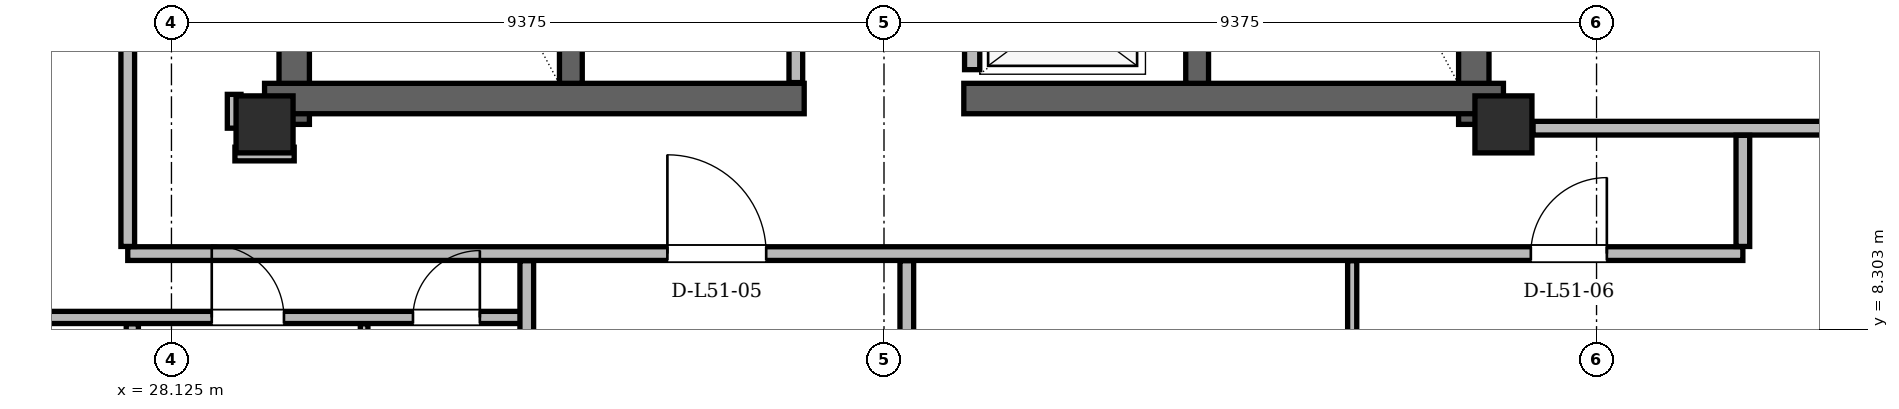
"""IFC4 building model, lengths in metres.
Left out: names, types, materials, properties, quantities, classifications, styles, units other than length and angle.
Written with IfcOpenShell. Run it as: python <this file> out.ifc"""

import sys

from ifc_helpers import new_model, si_unit, direction, frame, frame_2d, origin, origin_2d, place, context, subcontext, project, spatial, rectangle, hollow_rectangle, extrude, element, fill, save


model = new_model("IFC4")
c1 = context("Model", 3, precision=1e-05, world=origin(), true_north=direction((0.0, 1.0)))
c2 = subcontext(c1, "Body", "Model", "MODEL_VIEW")
j1 = project(units=[si_unit("LENGTHUNIT", "METRE"), si_unit("PLANEANGLEUNIT", "RADIAN")], contexts=[c1])
p1 = place(None, origin())
s1 = spatial("IfcSite", under=j1, at=p1, CompositionType="ELEMENT")
p2 = place(p1, origin())
s2 = spatial("IfcBuilding", under=s1, at=p2, CompositionType="ELEMENT")
p3 = place(p2, frame((0.0, 0.0, 193.8)))
s3 = spatial("IfcBuildingStorey", under=s2, at=p3, CompositionType="ELEMENT", Elevation=193.8)
for number, where, z_axis, x_axis in (
    (1, (29.35, 11.0, 0.0), (0.0, 0.0, 1.0), (1.0, 0.0, 0.0)),
    (2, (45.65, 11.0, 0.0), (0.0, 0.0, 1.0), (1.0, 0.0, 0.0)),
):
    element("IfcColumn", number, at=place(p3, frame(where, z_axis=z_axis, x_axis=x_axis)), inside=s3, PredefinedType="COLUMN", context=c2, shape_type="SweptSolid", body=[
        extrude(hollow_rectangle(XDim=0.75, YDim=0.75, WallThickness=0.06, at=origin_2d()), origin(), (0.0, 0.0, 1.0), 3.6),
    ])
for number, where, z_axis, x_axis in (
    (3, (29.74, 11.0, 0.0), (0.0, 0.0, 1.0), (0.0, 1.0, 0.0)),
    (4, (45.26, 11.0, 0.0), (0.0, 0.0, 1.0), (0.0, 1.0, 0.0)),
):
    element("IfcWall", number, at=place(p3, frame(where, z_axis=z_axis, x_axis=x_axis)), inside=s3, PredefinedType="SHEAR", context=c2, shape_type="SweptSolid", body=[
        extrude(rectangle(XDim=13.3, YDim=0.4, at=frame_2d((6.65, 0.0))), origin(), (0.0, 0.0, 1.0), 3.38),
    ])
for number, where, z_axis, x_axis in (
    (5, (29.35, 11.34, 0.0), (0.0, 0.0, 1.0), (1.0, 0.0, 0.0)),
    (6, (38.55, 11.34, 0.0), (0.0, 0.0, 1.0), (1.0, 0.0, 0.0)),
):
    element("IfcWall", number, at=place(p3, frame(where, z_axis=z_axis, x_axis=x_axis)), inside=s3, PredefinedType="SHEAR", context=c2, shape_type="SweptSolid", body=[
        extrude(rectangle(XDim=7.1, YDim=0.4, at=frame_2d((3.55, 0.0))), origin(), (0.0, 0.0, 1.0), 3.38),
    ])
for number, where, z_axis, x_axis in (
    (7, (33.38, 11.54, 0.0), (0.0, 0.0, 1.0), (0.0, 1.0, 0.0)),
    (8, (41.62, 11.54, 0.0), (0.0, 0.0, 1.0), (0.0, 1.0, 0.0)),
):
    element("IfcWall", number, at=place(p3, frame(where, z_axis=z_axis, x_axis=x_axis)), inside=s3, PredefinedType="SHEAR", context=c2, shape_type="SweptSolid", body=[
        extrude(rectangle(XDim=7.62, YDim=0.3, at=frame_2d((3.81, 0.0))), origin(), (0.0, 0.0, 1.0), 3.38),
    ])
p4 = place(p3, frame((59.426, 11.839, 0.0), z_axis=(0.0, 0.0, 1.0), x_axis=(-0.499997159266, 0.866027043877, 0.0)))
e9 = element("IfcWall", 9, at=p4, inside=s3, PredefinedType="SOLIDWALL", context=c2, shape_type="SweptSolid", body=[
    extrude(rectangle(XDim=36.235, YDim=0.29, at=frame_2d((18.117, 0.0))), origin(), (0.0, 0.0, 1.0), 2.677),
])
p5 = place(p4, frame((6.579, 0.0, 0.0)))
e10 = element("IfcOpeningElement", 10, at=p5, cuts=e9, PredefinedType="OPENING", context=c2, shape_type="SweptSolid", body=[
    extrude(rectangle(XDim=1.5, YDim=2.2, at=frame_2d((0.75, 1.1))), frame((0.0, 0.145, 0.0), z_axis=(0.0, -1.0, 0.0), x_axis=(1.0, 0.0, 0.0)), (0.0, 0.0, 1.0), 0.29),
])
p6 = place(p4, frame((26.7, 0.0, 0.0)))
e11 = element("IfcOpeningElement", 11, at=p6, cuts=e9, PredefinedType="OPENING", context=c2, shape_type="SweptSolid", body=[
    extrude(rectangle(XDim=1.5, YDim=2.2, at=frame_2d((0.75, 1.1))), frame((0.0, 0.145, 0.0), z_axis=(0.0, -1.0, 0.0), x_axis=(1.0, 0.0, 0.0)), (0.0, 0.0, 1.0), 0.29),
])
p7 = place(p4, frame((34.18, 0.0, 0.85)))
e12 = element("IfcOpeningElement", 12, at=p7, cuts=e9, PredefinedType="OPENING", context=c2, shape_type="SweptSolid", body=[
    extrude(rectangle(XDim=1.2, YDim=1.48, at=frame_2d((0.6, 0.74))), frame((0.0, 0.145, 0.0), z_axis=(0.0, -1.0, 0.0), x_axis=(1.0, 0.0, 0.0)), (0.0, 0.0, 1.0), 0.29),
])
p8 = place(p4, frame((16.442, 0.0, 0.85)))
e13 = element("IfcOpeningElement", 13, at=p8, cuts=e9, PredefinedType="OPENING", context=c2, shape_type="SweptSolid", body=[
    extrude(rectangle(XDim=2.5, YDim=1.717, at=frame_2d((1.25, 0.858))), frame((0.0, 0.145, 0.0), z_axis=(0.0, -1.0, 0.0), x_axis=(1.0, 0.0, 0.0)), (0.0, 0.0, 1.0), 0.29),
])
p9 = place(p3, frame((33.691, 43.219, 0.0), z_axis=(0.0, 0.0, 1.0), x_axis=(-0.499997159266, -0.866027043877, 0.0)))
e14 = element("IfcWall", 14, at=p9, inside=s3, PredefinedType="SOLIDWALL", context=c2, shape_type="SweptSolid", body=[
    extrude(rectangle(XDim=36.235, YDim=0.29, at=frame_2d((18.117, 0.0))), origin(), (0.0, 0.0, 1.0), 2.677),
])
p10 = place(p9, frame((6.579, 0.0, 0.0)))
e15 = element("IfcOpeningElement", 15, at=p10, cuts=e14, PredefinedType="OPENING", context=c2, shape_type="SweptSolid", body=[
    extrude(rectangle(XDim=1.5, YDim=2.2, at=frame_2d((0.75, 1.1))), frame((0.0, 0.145, 0.0), z_axis=(0.0, -1.0, 0.0), x_axis=(1.0, 0.0, 0.0)), (0.0, 0.0, 1.0), 0.29),
])
p11 = place(p9, frame((26.7, 0.0, 0.0)))
e16 = element("IfcOpeningElement", 16, at=p11, cuts=e14, PredefinedType="OPENING", context=c2, shape_type="SweptSolid", body=[
    extrude(rectangle(XDim=1.5, YDim=2.2, at=frame_2d((0.75, 1.1))), frame((0.0, 0.145, 0.0), z_axis=(0.0, -1.0, 0.0), x_axis=(1.0, 0.0, 0.0)), (0.0, 0.0, 1.0), 0.29),
])
p12 = place(p9, frame((32.74, 0.0, 0.85)))
e17 = element("IfcOpeningElement", 17, at=p12, cuts=e14, PredefinedType="OPENING", context=c2, shape_type="SweptSolid", body=[
    extrude(rectangle(XDim=2.4, YDim=1.717, at=frame_2d((1.2, 0.858))), frame((0.0, 0.145, 0.0), z_axis=(0.0, -1.0, 0.0), x_axis=(1.0, 0.0, 0.0)), (0.0, 0.0, 1.0), 0.29),
])
p13 = place(p9, frame((21.971, 0.0, 0.85)))
e18 = element("IfcOpeningElement", 18, at=p13, cuts=e14, PredefinedType="OPENING", context=c2, shape_type="SweptSolid", body=[
    extrude(rectangle(XDim=2.0, YDim=1.717, at=frame_2d((1.0, 0.858))), frame((0.0, 0.145, 0.0), z_axis=(0.0, -1.0, 0.0), x_axis=(1.0, 0.0, 0.0)), (0.0, 0.0, 1.0), 0.29),
])
p14 = place(p9, frame((2.383, 0.0, 0.85)))
e19 = element("IfcOpeningElement", 19, at=p14, cuts=e14, PredefinedType="OPENING", context=c2, shape_type="SweptSolid", body=[
    extrude(rectangle(XDim=1.6, YDim=1.7, at=frame_2d((0.8, 0.85))), frame((0.0, 0.145, 0.0), z_axis=(0.0, -1.0, 0.0), x_axis=(1.0, 0.0, 0.0)), (0.0, 0.0, 1.0), 0.29),
])
p15 = place(p9, frame((13.348, 0.0, 0.85)))
e20 = element("IfcOpeningElement", 20, at=p15, cuts=e14, PredefinedType="OPENING", context=c2, shape_type="SweptSolid", body=[
    extrude(rectangle(XDim=3.0, YDim=1.717, at=frame_2d((1.5, 0.858))), frame((0.0, 0.145, 0.0), z_axis=(0.0, -1.0, 0.0), x_axis=(1.0, 0.0, 0.0)), (0.0, 0.0, 1.0), 0.29),
])
p16 = place(p3, frame((36.34, 11.55, 0.0), z_axis=(0.0, 0.0, 1.0), x_axis=(0.0, 1.0, 0.0)))
e21 = element("IfcWall", 21, at=p16, inside=s3, PredefinedType="PARTITIONING", context=c2, shape_type="SweptSolid", body=[
    extrude(rectangle(XDim=5.55, YDim=0.18, at=frame_2d((2.775, 0.0))), origin(), (0.0, 0.0, 1.0), 3.38),
])
p17 = place(p16, frame((2.85, 0.0, 0.0)))
e22 = element("IfcOpeningElement", 22, at=p17, cuts=e21, PredefinedType="OPENING", context=c2, shape_type="SweptSolid", body=[
    extrude(rectangle(XDim=0.95, YDim=2.1, at=frame_2d((0.475, 1.05))), frame((0.0, 0.09, 0.0), z_axis=(0.0, -1.0, 0.0), x_axis=(1.0, 0.0, 0.0)), (0.0, 0.0, 1.0), 0.18),
])
p18 = place(p3, frame((38.66, 11.72, 0.0), z_axis=(0.0, 0.0, 1.0), x_axis=(0.0, 1.0, 0.0)))
e23 = element("IfcWall", 23, at=p18, inside=s3, PredefinedType="PARTITIONING", context=c2, shape_type="SweptSolid", body=[
    extrude(rectangle(XDim=9.1, YDim=0.2, at=frame_2d((4.55, 0.0))), origin(), (0.0, 0.0, 1.0), 3.38),
])
p19 = place(p18, frame((0.255, 0.0, 0.0)))
e24 = element("IfcOpeningElement", 24, at=p19, cuts=e23, PredefinedType="OPENING", context=c2, shape_type="SweptSolid", body=[
    extrude(rectangle(XDim=1.05, YDim=2.15, at=frame_2d((0.525, 1.075))), frame((0.0, 0.1, 0.0), z_axis=(0.0, -1.0, 0.0), x_axis=(1.0, 0.0, 0.0)), (0.0, 0.0, 1.0), 0.2),
])
p20 = place(p18, frame((2.105, 0.0, 0.0)))
e25 = element("IfcOpeningElement", 25, at=p20, cuts=e23, PredefinedType="OPENING", context=c2, shape_type="SweptSolid", body=[
    extrude(rectangle(XDim=1.05, YDim=2.15, at=frame_2d((0.525, 1.075))), frame((0.0, 0.1, 0.0), z_axis=(0.0, -1.0, 0.0), x_axis=(1.0, 0.0, 0.0)), (0.0, 0.0, 1.0), 0.2),
])
p21 = place(p18, frame((3.955, 0.0, 0.0)))
e26 = element("IfcOpeningElement", 26, at=p21, cuts=e23, PredefinedType="OPENING", context=c2, shape_type="SweptSolid", body=[
    extrude(rectangle(XDim=1.05, YDim=2.15, at=frame_2d((0.525, 1.075))), frame((0.0, 0.1, 0.0), z_axis=(0.0, -1.0, 0.0), x_axis=(1.0, 0.0, 0.0)), (0.0, 0.0, 1.0), 0.2),
])
p22 = place(p3, frame((17.697, 8.46, 0.0), z_axis=(0.0, 0.0, 1.0), x_axis=(1.0, 0.0, 0.0)))
e27 = element("IfcWall", 27, at=p22, inside=s3, PredefinedType="PARTITIONING", context=c2, shape_type="SweptSolid", body=[
    extrude(rectangle(XDim=15.153, YDim=0.16, at=frame_2d((7.577, 0.0))), origin(), (0.0, 0.0, 1.0), 2.913),
])
p23 = place(p22, frame((2.392, 0.0, 0.0)))
e28 = element("IfcOpeningElement", 28, at=p23, cuts=e27, PredefinedType="OPENING", context=c2, shape_type="SweptSolid", body=[
    extrude(rectangle(XDim=0.92, YDim=2.12, at=frame_2d((0.46, 1.06))), frame((0.0, 0.08, 0.0), z_axis=(0.0, -1.0, 0.0), x_axis=(1.0, 0.0, 0.0)), (0.0, 0.0, 1.0), 0.16),
])
p24 = place(p22, frame((7.346, 0.0, 0.0)))
e29 = element("IfcOpeningElement", 29, at=p24, cuts=e27, PredefinedType="OPENING", context=c2, shape_type="SweptSolid", body=[
    extrude(rectangle(XDim=0.95, YDim=2.1, at=frame_2d((0.475, 1.05))), frame((0.0, 0.08, 0.0), z_axis=(0.0, -1.0, 0.0), x_axis=(1.0, 0.0, 0.0)), (0.0, 0.0, 1.0), 0.16),
])
p25 = place(p22, frame((10.958, 0.0, 0.0)))
e30 = element("IfcOpeningElement", 30, at=p25, cuts=e27, PredefinedType="OPENING", context=c2, shape_type="SweptSolid", body=[
    extrude(rectangle(XDim=0.95, YDim=2.1, at=frame_2d((0.475, 1.05))), frame((0.0, 0.08, 0.0), z_axis=(0.0, -1.0, 0.0), x_axis=(1.0, 0.0, 0.0)), (0.0, 0.0, 1.0), 0.16),
])
p26 = place(p22, frame((13.606, 0.0, 0.0)))
e31 = element("IfcOpeningElement", 31, at=p26, cuts=e27, PredefinedType="OPENING", context=c2, shape_type="SweptSolid", body=[
    extrude(rectangle(XDim=0.88, YDim=2.08, at=frame_2d((0.44, 1.04))), frame((0.0, 0.08, 0.0), z_axis=(0.0, -1.0, 0.0), x_axis=(1.0, 0.0, 0.0)), (0.0, 0.0, 1.0), 0.16),
])
p27 = place(p3, frame((27.55, 9.3, 0.0), z_axis=(0.0, 0.0, 1.0), x_axis=(1.0, 0.0, 0.0)))
e32 = element("IfcWall", 32, at=p27, inside=s3, PredefinedType="PARTITIONING", context=c2, shape_type="SweptSolid", body=[
    extrude(rectangle(XDim=21.25, YDim=0.18, at=frame_2d((10.625, 0.0))), origin(), (0.0, 0.0, 1.0), 2.913),
])
p28 = place(p27, frame((7.1, 0.0, 0.0)))
e33 = element("IfcOpeningElement", 33, at=p28, cuts=e32, PredefinedType="OPENING", context=c2, shape_type="SweptSolid", body=[
    extrude(rectangle(XDim=1.3, YDim=2.2, at=frame_2d((0.65, 1.1))), frame((0.0, 0.09, 0.0), z_axis=(0.0, -1.0, 0.0), x_axis=(1.0, 0.0, 0.0)), (0.0, 0.0, 1.0), 0.18),
])
p29 = place(p27, frame((18.46, 0.0, 0.0)))
e34 = element("IfcOpeningElement", 34, at=p29, cuts=e32, PredefinedType="OPENING", context=c2, shape_type="SweptSolid", body=[
    extrude(rectangle(XDim=1.0, YDim=2.18, at=frame_2d((0.5, 1.09))), frame((0.0, 0.09, 0.0), z_axis=(0.0, -1.0, 0.0), x_axis=(1.0, 0.0, 0.0)), (0.0, 0.0, 1.0), 0.18),
])
p30 = place(p3, frame((28.96, 10.61, 0.0), z_axis=(0.0, 0.0, 1.0), x_axis=(1.0, 0.0, 0.0)))
e35 = element("IfcWall", 35, at=p30, inside=s3, PredefinedType="PARTITIONING", context=c2, shape_type="SweptSolid", body=[
    extrude(rectangle(XDim=0.78, YDim=0.18, at=frame_2d((0.39, 0.0))), origin(), (0.0, 0.0, 1.0), 3.38),
])
p31 = place(p3, frame((46.04, 10.95, 0.0), z_axis=(0.0, 0.0, 1.0), x_axis=(1.0, 0.0, 0.0)))
e36 = element("IfcWall", 36, at=p31, inside=s3, PredefinedType="PARTITIONING", context=c2, shape_type="SweptSolid", body=[
    extrude(rectangle(XDim=12.701, YDim=0.18, at=frame_2d((6.351, 0.0))), origin(), (0.0, 0.0, 1.0), 2.913),
])
p32 = place(p3, frame((27.55, 9.394, 0.0), z_axis=(0.0, 0.0, 1.0), x_axis=(0.0, 1.0, 0.0)))
e37 = element("IfcWall", 37, at=p32, inside=s3, PredefinedType="PARTITIONING", context=c2, shape_type="SweptSolid", body=[
    extrude(rectangle(XDim=7.312, YDim=0.18, at=frame_2d((3.656, 0.0))), origin(), (0.0, 0.0, 1.0), 2.913),
])
p33 = place(p32, frame((3.927, 0.0, 0.0)))
e38 = element("IfcOpeningElement", 38, at=p33, cuts=e37, PredefinedType="OPENING", context=c2, shape_type="SweptSolid", body=[
    extrude(rectangle(XDim=1.0, YDim=2.18, at=frame_2d((0.5, 1.09))), frame((0.0, 0.09, 0.0), z_axis=(0.0, -1.0, 0.0), x_axis=(1.0, 0.0, 0.0)), (0.0, 0.0, 1.0), 0.18),
])
p34 = place(p3, frame((27.61, 5.391, 0.0), z_axis=(0.0, 0.0, 1.0), x_axis=(0.0, 1.0, 0.0)))
e39 = element("IfcWall", 39, at=p34, inside=s3, PredefinedType="PARTITIONING", context=c2, shape_type="SweptSolid", body=[
    extrude(rectangle(XDim=2.985, YDim=0.16, at=frame_2d((1.493, 0.0))), origin(), (0.0, 0.0, 1.0), 2.966),
])
p35 = place(p3, frame((28.95, 10.95, 0.0), z_axis=(0.0, 0.0, 1.0), x_axis=(0.0, 1.0, 0.0)))
e40 = element("IfcWall", 40, at=p35, inside=s3, PredefinedType="PARTITIONING", context=c2, shape_type="SweptSolid", body=[
    extrude(rectangle(XDim=0.445, YDim=0.18, at=frame_2d((0.223, 0.0))), origin(), (0.0, 0.0, 1.0), 2.913),
])
p36 = place(p3, frame((30.66, 5.391, 0.0), z_axis=(0.0, 0.0, 1.0), x_axis=(0.0, 1.0, 0.0)))
e41 = element("IfcWall", 41, at=p36, inside=s3, PredefinedType="PARTITIONING", context=c2, shape_type="SweptSolid", body=[
    extrude(rectangle(XDim=2.985, YDim=0.1, at=frame_2d((1.493, 0.0))), origin(), (0.0, 0.0, 1.0), 2.966),
])
p37 = place(p3, frame((32.8, 5.391, 0.0), z_axis=(0.0, 0.0, 1.0), x_axis=(0.0, 1.0, 0.0)))
e42 = element("IfcWall", 42, at=p37, inside=s3, PredefinedType="PARTITIONING", context=c2, shape_type="SweptSolid", body=[
    extrude(rectangle(XDim=3.815, YDim=0.18, at=frame_2d((1.908, 0.0))), origin(), (0.0, 0.0, 1.0), 2.966),
])
p38 = place(p3, frame((37.8, 5.391, 0.0), z_axis=(0.0, 0.0, 1.0), x_axis=(0.0, 1.0, 0.0)))
e43 = element("IfcWall", 43, at=p38, inside=s3, PredefinedType="PARTITIONING", context=c2, shape_type="SweptSolid", body=[
    extrude(rectangle(XDim=3.815, YDim=0.18, at=frame_2d((1.908, 0.0))), origin(), (0.0, 0.0, 1.0), 3.38),
])
p39 = place(p3, frame((43.66, 5.391, 0.0), z_axis=(0.0, 0.0, 1.0), x_axis=(0.0, 1.0, 0.0)))
e44 = element("IfcWall", 44, at=p39, inside=s3, PredefinedType="PARTITIONING", context=c2, shape_type="SweptSolid", body=[
    extrude(rectangle(XDim=3.815, YDim=0.12, at=frame_2d((1.908, 0.0))), origin(), (0.0, 0.0, 1.0), 3.38),
])
p40 = place(p39, frame((1.515, 0.0, 0.0)))
e45 = element("IfcOpeningElement", 45, at=p40, cuts=e44, PredefinedType="OPENING", context=c2, shape_type="SweptSolid", body=[
    extrude(rectangle(XDim=0.88, YDim=2.08, at=frame_2d((0.44, 1.04))), frame((0.0, 0.06, 0.0), z_axis=(0.0, -1.0, 0.0), x_axis=(1.0, 0.0, 0.0)), (0.0, 0.0, 1.0), 0.12),
])
p41 = place(p3, frame((48.8, 9.394, 0.0), z_axis=(0.0, 0.0, 1.0), x_axis=(0.0, 1.0, 0.0)))
e46 = element("IfcWall", 46, at=p41, inside=s3, PredefinedType="PARTITIONING", context=c2, shape_type="SweptSolid", body=[
    extrude(rectangle(XDim=1.462, YDim=0.18, at=frame_2d((0.731, 0.0))), origin(), (0.0, 0.0, 1.0), 3.38),
])
p42 = place(p25, origin())
e47 = element("IfcDoor", 47, at=p42, inside=s3, OperationType="SINGLE_SWING_LEFT", PredefinedType="DOOR", context=c2, shape_type="SweptSolid", body=[
    extrude(rectangle(XDim=0.95, YDim=2.1, at=frame_2d((0.475, 1.05))), frame((0.0, 0.025, 0.0), z_axis=(0.0, -1.0, 0.0), x_axis=(1.0, 0.0, 0.0)), (0.0, 0.0, 1.0), 0.05),
])
fill(e30, e47)
p43 = place(p26, origin())
e48 = element("IfcDoor", 48, at=p43, inside=s3, OperationType="SINGLE_SWING_RIGHT", PredefinedType="DOOR", context=c2, shape_type="SweptSolid", body=[
    extrude(rectangle(XDim=0.88, YDim=2.08, at=frame_2d((0.44, 1.04))), frame((0.0, 0.025, 0.0), z_axis=(0.0, -1.0, 0.0), x_axis=(1.0, 0.0, 0.0)), (0.0, 0.0, 1.0), 0.05),
])
fill(e31, e48)
p44 = place(p28, origin())
e49 = element("IfcDoor", 49, at=p44, inside=s3, OperationType="SINGLE_SWING_LEFT", PredefinedType="DOOR", context=c2, shape_type="SweptSolid", body=[
    extrude(rectangle(XDim=1.3, YDim=2.2, at=frame_2d((0.65, 1.1))), frame((0.0, 0.025, 0.0), z_axis=(0.0, -1.0, 0.0), x_axis=(1.0, 0.0, 0.0)), (0.0, 0.0, 1.0), 0.05),
])
fill(e33, e49)
p45 = place(p29, origin())
e50 = element("IfcDoor", 50, at=p45, inside=s3, OperationType="SINGLE_SWING_RIGHT", PredefinedType="DOOR", context=c2, shape_type="SweptSolid", body=[
    extrude(rectangle(XDim=1.0, YDim=2.18, at=frame_2d((0.5, 1.09))), frame((0.0, 0.025, 0.0), z_axis=(0.0, -1.0, 0.0), x_axis=(1.0, 0.0, 0.0)), (0.0, 0.0, 1.0), 0.05),
])
fill(e34, e50)
save(model, sys.argv[1])
